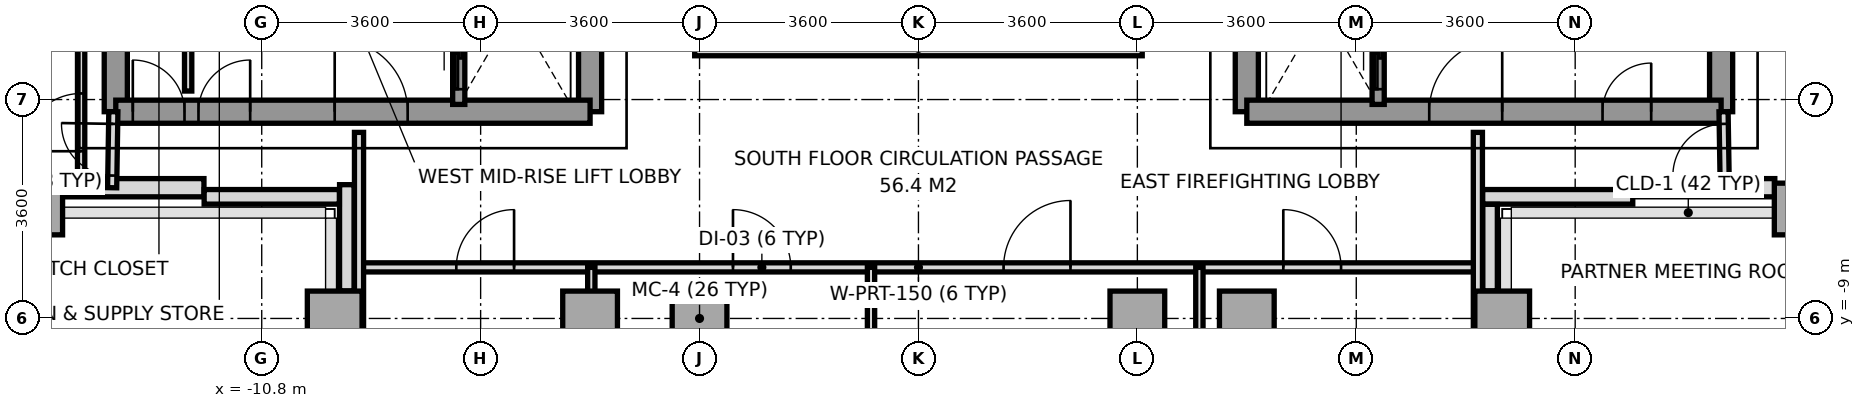
"""IFC4 building model, lengths in metres.
Left out: names, types, materials, properties, quantities, classifications, styles, units other than length and angle.
Written with IfcOpenShell. Run it as: python <this file> out.ifc"""

import sys

from ifc_helpers import new_model, si_unit, direction, frame, frame_2d, origin, origin_2d, place, context, subcontext, project, spatial, rectangle, extrude, source, transform, mapped, element, fill, save


model = new_model("IFC4")
c1 = context("Model", 3, precision=1e-05, world=origin(), true_north=direction((0.0, 1.0)))
c2 = subcontext(c1, "Body", "Model", "MODEL_VIEW")
j1 = project(units=[si_unit("LENGTHUNIT", "METRE"), si_unit("PLANEANGLEUNIT", "RADIAN")], contexts=[c1])
p1 = place(None, origin())
s1 = spatial("IfcSite", under=j1, at=p1, CompositionType="ELEMENT")
p2 = place(p1, origin())
s2 = spatial("IfcBuilding", under=s1, at=p2, CompositionType="ELEMENT")
p3 = place(p2, frame((0.0, 0.0, 160.4)))
s3 = spatial("IfcBuildingStorey", under=s2, at=p3, CompositionType="ELEMENT", Elevation=160.4)
m1 = source(origin(), c2, "Body", "SweptSolid", [
    extrude(rectangle(XDim=0.65, YDim=0.85, at=origin_2d()), origin(), (0.0, 0.0, 1.0), 3.2),
])
p4 = place(p3, frame((-14.4, -7.2, 0.0), z_axis=(0.0, 0.0, 1.0), x_axis=(1.0, 0.0, 0.0)))
e1 = element("IfcColumn", 1, at=p4, inside=s3, PredefinedType="COLUMN", context=c2, shape_type="MappedRepresentation", body=[
    mapped(m1, transform((0.0, 0.0, 0.0), x_axis=(1.0, 0.0, 0.0), y_axis=(0.0, 1.0, 0.0), z_axis=(0.0, 0.0, 1.0), scale=1.0)),
])
m2 = source(origin(), c2, "Body", "SweptSolid", [
    extrude(rectangle(XDim=0.9, YDim=0.9, at=origin_2d()), origin(), (0.0, 0.0, 1.0), 3.2),
])
for number, where, z_axis, x_axis in (
    (2, (-9.6, -9.0, 0.0), (0.0, 0.0, 1.0), (1.0, 0.0, 0.0)),
    (3, (-5.4, -9.0, 0.0), (0.0, 0.0, 1.0), (1.0, 0.0, 0.0)),
    (4, (-3.6, -9.0, 0.0), (0.0, 0.0, 1.0), (1.0, 0.0, 0.0)),
    (5, (3.6, -9.0, 0.0), (0.0, 0.0, 1.0), (1.0, 0.0, 0.0)),
    (6, (5.4, -9.0, 0.0), (0.0, 0.0, 1.0), (1.0, 0.0, 0.0)),
    (7, (9.6, -9.0, 0.0), (0.0, 0.0, 1.0), (1.0, 0.0, 0.0)),
):
    element("IfcColumn", number, at=place(p3, frame(where, z_axis=z_axis, x_axis=x_axis)), inside=s3, PredefinedType="COLUMN", context=c2, shape_type="MappedRepresentation", body=[
        mapped(m2, transform((0.0, 0.0, 0.0), x_axis=(1.0, 0.0, 0.0), y_axis=(0.0, 1.0, 0.0), z_axis=(0.0, 0.0, 1.0), scale=1.0)),
    ])
p5 = place(p3, frame((14.4, -7.2, 0.0), z_axis=(0.0, 0.0, 1.0), x_axis=(1.0, 0.0, 0.0)))
e8 = element("IfcColumn", 8, at=p5, inside=s3, PredefinedType="COLUMN", context=c2, shape_type="MappedRepresentation", body=[
    mapped(m1, transform((0.0, 0.0, 0.0), x_axis=(1.0, 0.0, 0.0), y_axis=(0.0, 1.0, 0.0), z_axis=(0.0, 0.0, 1.0), scale=1.0)),
])
for number, where, z_axis, x_axis in (
    (9, (-14.083, -6.85, 0.0), (0.0, 0.0, 1.0), (1.0, 0.0, 0.0)),
    (10, (11.75, -6.85, 0.0), (0.0, 0.0, 1.0), (1.0, 0.0, 0.0)),
):
    element("IfcWall", number, at=place(p3, frame(where, z_axis=z_axis, x_axis=x_axis)), inside=s3, PredefinedType="SOLIDWALL", context=c2, shape_type="SweptSolid", body=[
        extrude(rectangle(XDim=2.333, YDim=0.3, at=frame_2d((1.167, 0.0))), origin(), (0.0, 0.0, 1.0), 3.2),
    ])
p6 = place(p3, frame((11.747, -7.0, 0.0), z_axis=(0.0, 0.0, 1.0), x_axis=(-1.0, 0.0, 0.0)))
e11 = element("IfcWall", 11, at=p6, inside=s3, PredefinedType="PARAPET", context=c2, shape_type="SweptSolid", body=[
    extrude(rectangle(XDim=2.469, YDim=0.24, at=frame_2d((1.234, 0.0))), origin(), (0.0, 0.0, 1.0), 1.15),
])
p7 = place(p3, frame((9.4, -7.123, 0.0), z_axis=(0.0, 0.0, 1.0), x_axis=(0.0, -1.0, 0.0)))
e12 = element("IfcWall", 12, at=p7, inside=s3, PredefinedType="PARAPET", context=c2, shape_type="SweptSolid", body=[
    extrude(rectangle(XDim=1.424, YDim=0.24, at=frame_2d((0.712, 0.0))), origin(), (0.0, 0.0, 1.0), 1.15),
])
p8 = place(p3, frame((-9.4, -8.547, 0.0), z_axis=(0.0, 0.0, 1.0), x_axis=(0.0, 1.0, 0.0)))
e13 = element("IfcWall", 13, at=p8, inside=s3, PredefinedType="PARAPET", context=c2, shape_type="SweptSolid", body=[
    extrude(rectangle(XDim=1.747, YDim=0.24, at=frame_2d((0.874, 0.0))), origin(), (0.0, 0.0, 1.0), 1.15),
])
p9 = place(p3, frame((-9.523, -7.0, 0.0), z_axis=(0.0, 0.0, 1.0), x_axis=(-1.0, 0.0, 0.0)))
e14 = element("IfcWall", 14, at=p9, inside=s3, PredefinedType="PARAPET", context=c2, shape_type="SweptSolid", body=[
    extrude(rectangle(XDim=2.224, YDim=0.24, at=frame_2d((1.112, 0.0))), origin(), (0.0, 0.0, 1.0), 1.15),
])
p10 = place(p3, frame((-13.2, -5.6, 0.0), z_axis=(0.0, 0.0, 1.0), x_axis=(0.0, 1.0, 0.0)))
e15 = element("IfcWall", 15, at=p10, inside=s3, PredefinedType="SHEAR", context=c2, shape_type="SweptSolid", body=[
    extrude(rectangle(XDim=11.2, YDim=0.38, at=frame_2d((5.6, 0.0))), origin(), (0.0, 0.0, 1.0), 3.2),
])
p11 = place(p3, frame((-5.4, -5.6, 0.0), z_axis=(0.0, 0.0, 1.0), x_axis=(0.0, 1.0, 0.0)))
e16 = element("IfcWall", 16, at=p11, inside=s3, PredefinedType="SHEAR", context=c2, shape_type="SweptSolid", body=[
    extrude(rectangle(XDim=12.5, YDim=0.38, at=frame_2d((6.25, 0.0))), origin(), (0.0, 0.0, 1.0), 3.2),
])
p12 = place(p11, frame((4.55, 0.0, 0.0)))
e17 = element("IfcOpeningElement", 17, at=p12, cuts=e16, PredefinedType="OPENING", context=c2, shape_type="SweptSolid", body=[
    extrude(rectangle(XDim=1.2, YDim=2.2, at=frame_2d((0.6, 1.1))), frame((0.0, 0.2, 0.0), z_axis=(0.0, -1.0, 0.0), x_axis=(1.0, 0.0, 0.0)), (0.0, 0.0, 1.0), 0.4),
])
p13 = place(p11, frame((6.86, 0.0, 0.0)))
e18 = element("IfcOpeningElement", 18, at=p13, cuts=e16, PredefinedType="OPENING", context=c2, shape_type="SweptSolid", body=[
    extrude(rectangle(XDim=0.8, YDim=2.1, at=frame_2d((0.4, 1.05))), frame((0.0, 0.2, 0.0), z_axis=(0.0, -1.0, 0.0), x_axis=(1.0, 0.0, 0.0)), (0.0, 0.0, 1.0), 0.4),
])
p14 = place(p3, frame((-13.2, -5.6, 0.0), z_axis=(0.0, 0.0, 1.0), x_axis=(1.0, 0.0, 0.0)))
e19 = element("IfcWall", 19, at=p14, inside=s3, PredefinedType="SHEAR", context=c2, shape_type="SweptSolid", body=[
    extrude(rectangle(XDim=7.8, YDim=0.38, at=frame_2d((3.9, 0.0))), origin(), (0.0, 0.0, 1.0), 3.2),
])
p15 = place(p14, frame((3.6, 0.0, 0.0)))
e20 = element("IfcOpeningElement", 20, at=p15, cuts=e19, PredefinedType="OPENING", context=c2, shape_type="SweptSolid", body=[
    extrude(rectangle(XDim=1.2, YDim=2.2, at=frame_2d((0.6, 1.1))), frame((0.0, 0.2, 0.0), z_axis=(0.0, -1.0, 0.0), x_axis=(1.0, 0.0, 0.0)), (0.0, 0.0, 1.0), 0.4),
])
p16 = place(p14, frame((0.28, 0.0, 0.0)))
e21 = element("IfcOpeningElement", 21, at=p16, cuts=e19, PredefinedType="OPENING", context=c2, shape_type="SweptSolid", body=[
    extrude(rectangle(XDim=0.85, YDim=2.1, at=frame_2d((0.425, 1.05))), frame((0.0, 0.2, 0.0), z_axis=(0.0, -1.0, 0.0), x_axis=(1.0, 0.0, 0.0)), (0.0, 0.0, 1.0), 0.4),
])
p17 = place(p14, frame((1.36, 0.0, 0.0)))
e22 = element("IfcOpeningElement", 22, at=p17, cuts=e19, PredefinedType="OPENING", context=c2, shape_type="SweptSolid", body=[
    extrude(rectangle(XDim=0.85, YDim=2.1, at=frame_2d((0.425, 1.05))), frame((0.0, 0.2, 0.0), z_axis=(0.0, -1.0, 0.0), x_axis=(1.0, 0.0, 0.0)), (0.0, 0.0, 1.0), 0.4),
])
p18 = place(p3, frame((13.2, -5.6, 0.0), z_axis=(0.0, 0.0, 1.0), x_axis=(0.0, 1.0, 0.0)))
e23 = element("IfcWall", 23, at=p18, inside=s3, PredefinedType="SHEAR", context=c2, shape_type="SweptSolid", body=[
    extrude(rectangle(XDim=11.2, YDim=0.38, at=frame_2d((5.6, 0.0))), origin(), (0.0, 0.0, 1.0), 3.2),
])
p19 = place(p3, frame((5.4, -5.6, 0.0), z_axis=(0.0, 0.0, 1.0), x_axis=(0.0, 1.0, 0.0)))
e24 = element("IfcWall", 24, at=p19, inside=s3, PredefinedType="SHEAR", context=c2, shape_type="SweptSolid", body=[
    extrude(rectangle(XDim=12.5, YDim=0.38, at=frame_2d((6.25, 0.0))), origin(), (0.0, 0.0, 1.0), 3.2),
])
p20 = place(p19, frame((4.55, 0.0, 0.0)))
e25 = element("IfcOpeningElement", 25, at=p20, cuts=e24, PredefinedType="OPENING", context=c2, shape_type="SweptSolid", body=[
    extrude(rectangle(XDim=1.2, YDim=2.2, at=frame_2d((0.6, 1.1))), frame((0.0, 0.2, 0.0), z_axis=(0.0, -1.0, 0.0), x_axis=(1.0, 0.0, 0.0)), (0.0, 0.0, 1.0), 0.4),
])
p21 = place(p19, frame((6.86, 0.0, 0.0)))
e26 = element("IfcOpeningElement", 26, at=p21, cuts=e24, PredefinedType="OPENING", context=c2, shape_type="SweptSolid", body=[
    extrude(rectangle(XDim=0.8, YDim=2.1, at=frame_2d((0.4, 1.05))), frame((0.0, 0.2, 0.0), z_axis=(0.0, -1.0, 0.0), x_axis=(1.0, 0.0, 0.0)), (0.0, 0.0, 1.0), 0.4),
])
p22 = place(p19, frame((7.88, 0.0, 0.0)))
e27 = element("IfcOpeningElement", 27, at=p22, cuts=e24, PredefinedType="OPENING", context=c2, shape_type="SweptSolid", body=[
    extrude(rectangle(XDim=0.8, YDim=2.1, at=frame_2d((0.4, 1.05))), frame((0.0, 0.2, 0.0), z_axis=(0.0, -1.0, 0.0), x_axis=(1.0, 0.0, 0.0)), (0.0, 0.0, 1.0), 0.4),
])
p23 = place(p3, frame((5.4, -5.6, 0.0), z_axis=(0.0, 0.0, 1.0), x_axis=(1.0, 0.0, 0.0)))
e28 = element("IfcWall", 28, at=p23, inside=s3, PredefinedType="SHEAR", context=c2, shape_type="SweptSolid", body=[
    extrude(rectangle(XDim=7.8, YDim=0.38, at=frame_2d((3.9, 0.0))), origin(), (0.0, 0.0, 1.0), 3.2),
])
p24 = place(p23, frame((3.0, 0.0, 0.0)))
e29 = element("IfcOpeningElement", 29, at=p24, cuts=e28, PredefinedType="OPENING", context=c2, shape_type="SweptSolid", body=[
    extrude(rectangle(XDim=1.2, YDim=2.2, at=frame_2d((0.6, 1.1))), frame((0.0, 0.2, 0.0), z_axis=(0.0, -1.0, 0.0), x_axis=(1.0, 0.0, 0.0)), (0.0, 0.0, 1.0), 0.4),
])
p25 = place(p23, frame((5.85, 0.0, 0.0)))
e30 = element("IfcOpeningElement", 30, at=p25, cuts=e28, PredefinedType="OPENING", context=c2, shape_type="SweptSolid", body=[
    extrude(rectangle(XDim=0.8, YDim=2.1, at=frame_2d((0.4, 1.05))), frame((0.0, 0.2, 0.0), z_axis=(0.0, -1.0, 0.0), x_axis=(1.0, 0.0, 0.0)), (0.0, 0.0, 1.0), 0.4),
])
p26 = place(p3, frame((-7.56, -5.48, 0.0), z_axis=(0.0, 0.0, 1.0), x_axis=(0.0, 1.0, 0.0)))
e31 = element("IfcWall", 31, at=p26, inside=s3, PredefinedType="SOLIDWALL", context=c2, shape_type="SweptSolid", body=[
    extrude(rectangle(XDim=1.6, YDim=0.2, at=frame_2d((0.8, 0.0))), origin(), (0.0, 0.0, 1.0), 3.2),
])
p27 = place(p26, frame((0.25, 0.0, 0.0)))
e32 = element("IfcOpeningElement", 32, at=p27, cuts=e31, PredefinedType="OPENING", context=c2, shape_type="SweptSolid", body=[
    extrude(rectangle(XDim=1.1, YDim=2.2, at=frame_2d((0.55, 1.1))), frame((0.0, 0.11, 0.0), z_axis=(0.0, -1.0, 0.0), x_axis=(1.0, 0.0, 0.0)), (0.0, 0.0, 1.0), 0.22),
])
p28 = place(p3, frame((7.56, -5.48, 0.0), z_axis=(0.0, 0.0, 1.0), x_axis=(0.0, 1.0, 0.0)))
e33 = element("IfcWall", 33, at=p28, inside=s3, PredefinedType="SOLIDWALL", context=c2, shape_type="SweptSolid", body=[
    extrude(rectangle(XDim=1.6, YDim=0.2, at=frame_2d((0.8, 0.0))), origin(), (0.0, 0.0, 1.0), 3.2),
])
p29 = place(p28, frame((0.25, 0.0, 0.0)))
e34 = element("IfcOpeningElement", 34, at=p29, cuts=e33, PredefinedType="OPENING", context=c2, shape_type="SweptSolid", body=[
    extrude(rectangle(XDim=1.1, YDim=2.2, at=frame_2d((0.55, 1.1))), frame((0.0, 0.11, 0.0), z_axis=(0.0, -1.0, 0.0), x_axis=(1.0, 0.0, 0.0)), (0.0, 0.0, 1.0), 0.22),
])
p30 = place(p3, frame((-12.01, -5.26, 0.0), z_axis=(0.0, 0.0, 1.0), x_axis=(0.0, 1.0, 0.0)))
e35 = element("IfcWall", 35, at=p30, inside=s3, PredefinedType="PARTITIONING", context=c2, shape_type="SweptSolid", body=[
    extrude(rectangle(XDim=2.94, YDim=0.12, at=frame_2d((1.47, 0.0))), origin(), (0.0, 0.0, 1.0), 3.2),
])
p31 = place(p3, frame((-9.2, -8.16, 0.0), z_axis=(0.0, 0.0, 1.0), x_axis=(1.0, 0.0, 0.0)))
e36 = element("IfcWall", 36, at=p31, inside=s3, PredefinedType="PARTITIONING", context=c2, shape_type="SweptSolid", body=[
    extrude(rectangle(XDim=18.4, YDim=0.15, at=frame_2d((9.2, 0.0))), origin(), (0.0, 0.0, 1.0), 2.8),
])
p32 = place(p31, frame((1.6, 0.0, 0.0)))
e37 = element("IfcOpeningElement", 37, at=p32, cuts=e36, PredefinedType="OPENING", context=c2, shape_type="SweptSolid", body=[
    extrude(rectangle(XDim=0.95, YDim=2.15, at=frame_2d((0.475, 1.075))), frame((0.0, 0.085, 0.0), z_axis=(0.0, -1.0, 0.0), x_axis=(1.0, 0.0, 0.0)), (0.0, 0.0, 1.0), 0.17),
])
p33 = place(p31, frame((6.15, 0.0, 0.0)))
e38 = element("IfcOpeningElement", 38, at=p33, cuts=e36, PredefinedType="OPENING", context=c2, shape_type="SweptSolid", body=[
    extrude(rectangle(XDim=0.95, YDim=2.15, at=frame_2d((0.475, 1.075))), frame((0.0, 0.085, 0.0), z_axis=(0.0, -1.0, 0.0), x_axis=(1.0, 0.0, 0.0)), (0.0, 0.0, 1.0), 0.17),
])
p34 = place(p31, frame((10.6, 0.0, 0.0)))
e39 = element("IfcOpeningElement", 39, at=p34, cuts=e36, PredefinedType="OPENING", context=c2, shape_type="SweptSolid", body=[
    extrude(rectangle(XDim=1.1, YDim=2.2, at=frame_2d((0.55, 1.1))), frame((0.0, 0.085, 0.0), z_axis=(0.0, -1.0, 0.0), x_axis=(1.0, 0.0, 0.0)), (0.0, 0.0, 1.0), 0.17),
])
p35 = place(p31, frame((15.2, 0.0, 0.0)))
e40 = element("IfcOpeningElement", 40, at=p35, cuts=e36, PredefinedType="OPENING", context=c2, shape_type="SweptSolid", body=[
    extrude(rectangle(XDim=0.95, YDim=2.15, at=frame_2d((0.475, 1.075))), frame((0.0, 0.085, 0.0), z_axis=(0.0, -1.0, 0.0), x_axis=(1.0, 0.0, 0.0)), (0.0, 0.0, 1.0), 0.17),
])
for number, where, z_axis, x_axis in (
    (41, (-9.2, -15.68, 0.0), (0.0, 0.0, 1.0), (0.0, 1.0, 0.0)),
    (42, (9.2, -15.68, 0.0), (0.0, 0.0, 1.0), (0.0, 1.0, 0.0)),
):
    element("IfcWall", number, at=place(p3, frame(where, z_axis=z_axis, x_axis=x_axis)), inside=s3, PredefinedType="PARTITIONING", context=c2, shape_type="SweptSolid", body=[
        extrude(rectangle(XDim=9.74, YDim=0.15, at=frame_2d((4.87, 0.0))), origin(), (0.0, 0.0, 1.0), 2.75),
    ])
for number, where, z_axis, x_axis in (
    (43, (-5.38, -24.65, 0.0), (0.0, 0.0, 1.0), (0.0, 1.0, 0.0)),
    (44, (-0.78, -24.65, 0.0), (0.0, 0.0, 1.0), (0.0, 1.0, 0.0)),
    (45, (4.62, -24.65, 0.0), (0.0, 0.0, 1.0), (0.0, 1.0, 0.0)),
):
    element("IfcWall", number, at=place(p3, frame(where, z_axis=z_axis, x_axis=x_axis)), inside=s3, PredefinedType="PARTITIONING", context=c2, shape_type="SweptSolid", body=[
        extrude(rectangle(XDim=16.49, YDim=0.12, at=frame_2d((8.245, 0.0))), origin(), (0.0, 0.0, 1.0), 2.75),
    ])
p36 = place(p3, frame((-13.26, -6.85, 0.0), z_axis=(0.0, 0.0, 1.0), x_axis=(0.016013571389, 0.999871774545, 0.0)))
e46 = element("IfcWall", 46, at=p36, inside=s3, PredefinedType="PARTITIONING", context=c2, shape_type="SweptSolid", body=[
    extrude(rectangle(XDim=1.25, YDim=0.15, at=frame_2d((0.625, 0.0))), origin(), (0.0, 0.0, 1.0), 3.2),
])
p37 = place(p36, frame((0.2, 0.0, 0.0)))
e47 = element("IfcOpeningElement", 47, at=p37, cuts=e46, PredefinedType="OPENING", context=c2, shape_type="SweptSolid", body=[
    extrude(rectangle(XDim=0.85, YDim=2.1, at=frame_2d((0.425, 1.05))), frame((0.0, 0.085, 0.0), z_axis=(0.0, -1.0, 0.0), x_axis=(1.0, 0.0, 0.0)), (0.0, 0.0, 1.0), 0.17),
])
p38 = place(p3, frame((-13.77, -6.85, 0.0), z_axis=(0.0, 0.0, 1.0), x_axis=(0.0, 1.0, 0.0)))
e48 = element("IfcWall", 48, at=p38, inside=s3, PredefinedType="PARTITIONING", context=c2, shape_type="SweptSolid", body=[
    extrude(rectangle(XDim=13.7, YDim=0.12, at=frame_2d((6.85, 0.0))), origin(), (0.0, 0.0, 1.0), 2.87),
])
p39 = place(p38, frame((0.6, 0.0, 0.0)))
e49 = element("IfcOpeningElement", 49, at=p39, cuts=e48, PredefinedType="OPENING", context=c2, shape_type="SweptSolid", body=[
    extrude(rectangle(XDim=0.95, YDim=2.15, at=frame_2d((0.475, 1.075))), frame((0.0, 0.07, 0.0), z_axis=(0.0, -1.0, 0.0), x_axis=(1.0, 0.0, 0.0)), (0.0, 0.0, 1.0), 0.14),
])
p40 = place(p3, frame((13.26, -6.85, 0.0), z_axis=(0.0, 0.0, 1.0), x_axis=(-0.016013571389, 0.999871774545, 0.0)))
e50 = element("IfcWall", 50, at=p40, inside=s3, PredefinedType="PARTITIONING", context=c2, shape_type="SweptSolid", body=[
    extrude(rectangle(XDim=1.25, YDim=0.15, at=frame_2d((0.625, 0.0))), origin(), (0.0, 0.0, 1.0), 3.2),
])
p41 = place(p40, frame((0.2, 0.0, 0.0)))
e51 = element("IfcOpeningElement", 51, at=p41, cuts=e50, PredefinedType="OPENING", context=c2, shape_type="SweptSolid", body=[
    extrude(rectangle(XDim=0.85, YDim=2.1, at=frame_2d((0.425, 1.05))), frame((0.0, 0.085, 0.0), z_axis=(0.0, -1.0, 0.0), x_axis=(1.0, 0.0, 0.0)), (0.0, 0.0, 1.0), 0.17),
])
p42 = place(p3, frame((-3.68, -4.56, 0.0), z_axis=(0.0, 0.0, 1.0), x_axis=(1.0, 0.0, 0.0)))
e52 = element("IfcWall", 52, at=p42, inside=s3, PredefinedType="PARAPET", context=c2, shape_type="SweptSolid", body=[
    extrude(rectangle(XDim=7.36, YDim=0.24, at=frame_2d((3.68, 0.0))), origin(), (0.0, 0.0, 1.0), 1.15),
])
m3 = source(origin(), c2, "Body", "SweptSolid", [
    extrude(rectangle(XDim=1.2, YDim=2.2, at=frame_2d((0.6, 1.1))), frame((0.0, 0.025, 0.0), z_axis=(0.0, -1.0, 0.0), x_axis=(1.0, 0.0, 0.0)), (0.0, 0.0, 1.0), 0.05),
])
p43 = place(p15, origin())
e53 = element("IfcDoor", 53, at=p43, inside=s3, OperationType="SINGLE_SWING_LEFT", PredefinedType="DOOR", context=c2, shape_type="MappedRepresentation", body=[
    mapped(m3, transform((0.0, 0.0, 0.0), x_axis=(1.0, 0.0, 0.0), y_axis=(0.0, 1.0, 0.0), z_axis=(0.0, 0.0, 1.0), scale=1.0)),
])
fill(e20, e53)
p44 = place(p24, origin())
e54 = element("IfcDoor", 54, at=p44, inside=s3, OperationType="SINGLE_SWING_RIGHT", PredefinedType="DOOR", context=c2, shape_type="MappedRepresentation", body=[
    mapped(m3, transform((0.0, 0.0, 0.0), x_axis=(1.0, 0.0, 0.0), y_axis=(0.0, 1.0, 0.0), z_axis=(0.0, 0.0, 1.0), scale=1.0)),
])
fill(e29, e54)
m4 = source(origin(), c2, "Body", "SweptSolid", [
    extrude(rectangle(XDim=0.85, YDim=2.1, at=frame_2d((0.425, 1.05))), frame((0.0, 0.025, 0.0), z_axis=(0.0, -1.0, 0.0), x_axis=(1.0, 0.0, 0.0)), (0.0, 0.0, 1.0), 0.05),
])
p45 = place(p16, origin())
e55 = element("IfcDoor", 55, at=p45, inside=s3, OperationType="SINGLE_SWING_LEFT", PredefinedType="DOOR", context=c2, shape_type="MappedRepresentation", body=[
    mapped(m4, transform((0.0, 0.0, 0.0), x_axis=(1.0, 0.0, 0.0), y_axis=(0.0, 1.0, 0.0), z_axis=(0.0, 0.0, 1.0), scale=1.0)),
])
fill(e21, e55)
p46 = place(p17, origin())
e56 = element("IfcDoor", 56, at=p46, inside=s3, OperationType="SINGLE_SWING_RIGHT", PredefinedType="DOOR", context=c2, shape_type="MappedRepresentation", body=[
    mapped(m4, transform((0.0, 0.0, 0.0), x_axis=(1.0, 0.0, 0.0), y_axis=(0.0, 1.0, 0.0), z_axis=(0.0, 0.0, 1.0), scale=1.0)),
])
fill(e22, e56)
m5 = source(origin(), c2, "Body", "SweptSolid", [
    extrude(rectangle(XDim=0.8, YDim=2.1, at=frame_2d((0.4, 1.05))), frame((0.0, 0.025, 0.0), z_axis=(0.0, -1.0, 0.0), x_axis=(1.0, 0.0, 0.0)), (0.0, 0.0, 1.0), 0.05),
])
p47 = place(p25, origin())
e57 = element("IfcDoor", 57, at=p47, inside=s3, OperationType="SINGLE_SWING_RIGHT", PredefinedType="DOOR", context=c2, shape_type="MappedRepresentation", body=[
    mapped(m5, transform((0.0, 0.0, 0.0), x_axis=(1.0, 0.0, 0.0), y_axis=(0.0, 1.0, 0.0), z_axis=(0.0, 0.0, 1.0), scale=1.0)),
])
fill(e30, e57)
m6 = source(origin(), c2, "Body", "SweptSolid", [
    extrude(rectangle(XDim=1.1, YDim=2.2, at=frame_2d((0.55, 1.1))), frame((0.0, 0.025, 0.0), z_axis=(0.0, -1.0, 0.0), x_axis=(1.0, 0.0, 0.0)), (0.0, 0.0, 1.0), 0.05),
])
p48 = place(p27, origin())
e58 = element("IfcDoor", 58, at=p48, inside=s3, OperationType="SLIDING_TO_LEFT", PredefinedType="DOOR", context=c2, shape_type="MappedRepresentation", body=[
    mapped(m6, transform((0.0, 0.0, 0.0), x_axis=(1.0, 0.0, 0.0), y_axis=(0.0, 1.0, 0.0), z_axis=(0.0, 0.0, 1.0), scale=1.0)),
])
fill(e32, e58)
p49 = place(p29, origin())
e59 = element("IfcDoor", 59, at=p49, inside=s3, OperationType="SLIDING_TO_LEFT", PredefinedType="DOOR", context=c2, shape_type="MappedRepresentation", body=[
    mapped(m6, transform((0.0, 0.0, 0.0), x_axis=(1.0, 0.0, 0.0), y_axis=(0.0, 1.0, 0.0), z_axis=(0.0, 0.0, 1.0), scale=1.0)),
])
fill(e34, e59)
m7 = source(origin(), c2, "Body", "SweptSolid", [
    extrude(rectangle(XDim=0.95, YDim=2.15, at=frame_2d((0.475, 1.075))), frame((0.0, 0.025, 0.0), z_axis=(0.0, -1.0, 0.0), x_axis=(1.0, 0.0, 0.0)), (0.0, 0.0, 1.0), 0.05),
])
p50 = place(p32, origin())
e60 = element("IfcDoor", 60, at=p50, inside=s3, OperationType="SINGLE_SWING_RIGHT", PredefinedType="DOOR", context=c2, shape_type="MappedRepresentation", body=[
    mapped(m7, transform((0.0, 0.0, 0.0), x_axis=(1.0, 0.0, 0.0), y_axis=(0.0, 1.0, 0.0), z_axis=(0.0, 0.0, 1.0), scale=1.0)),
])
fill(e37, e60)
p51 = place(p33, origin())
e61 = element("IfcDoor", 61, at=p51, inside=s3, OperationType="SINGLE_SWING_LEFT", PredefinedType="DOOR", context=c2, shape_type="MappedRepresentation", body=[
    mapped(m7, transform((0.0, 0.0, 0.0), x_axis=(1.0, 0.0, 0.0), y_axis=(0.0, 1.0, 0.0), z_axis=(0.0, 0.0, 1.0), scale=1.0)),
])
fill(e38, e61)
p52 = place(p34, origin())
e62 = element("IfcDoor", 62, at=p52, inside=s3, OperationType="SINGLE_SWING_RIGHT", PredefinedType="DOOR", context=c2, shape_type="MappedRepresentation", body=[
    mapped(m6, transform((0.0, 0.0, 0.0), x_axis=(1.0, 0.0, 0.0), y_axis=(0.0, 1.0, 0.0), z_axis=(0.0, 0.0, 1.0), scale=1.0)),
])
fill(e39, e62)
p53 = place(p35, origin())
e63 = element("IfcDoor", 63, at=p53, inside=s3, OperationType="SINGLE_SWING_LEFT", PredefinedType="DOOR", context=c2, shape_type="MappedRepresentation", body=[
    mapped(m7, transform((0.0, 0.0, 0.0), x_axis=(1.0, 0.0, 0.0), y_axis=(0.0, 1.0, 0.0), z_axis=(0.0, 0.0, 1.0), scale=1.0)),
])
fill(e40, e63)
p54 = place(p39, origin())
e64 = element("IfcDoor", 64, at=p54, inside=s3, OperationType="SINGLE_SWING_LEFT", PredefinedType="DOOR", context=c2, shape_type="MappedRepresentation", body=[
    mapped(m7, transform((0.0, 0.0, 0.0), x_axis=(1.0, 0.0, 0.0), y_axis=(0.0, 1.0, 0.0), z_axis=(0.0, 0.0, 1.0), scale=1.0)),
])
fill(e49, e64)
p55 = place(p37, origin())
e65 = element("IfcDoor", 65, at=p55, inside=s3, OperationType="SINGLE_SWING_RIGHT", PredefinedType="DOOR", context=c2, shape_type="MappedRepresentation", body=[
    mapped(m4, transform((0.0, 0.0, 0.0), x_axis=(1.0, 0.0, 0.0), y_axis=(0.0, 1.0, 0.0), z_axis=(0.0, 0.0, 1.0), scale=1.0)),
])
fill(e47, e65)
p56 = place(p41, origin())
e66 = element("IfcDoor", 66, at=p56, inside=s3, OperationType="SINGLE_SWING_LEFT", PredefinedType="DOOR", context=c2, shape_type="MappedRepresentation", body=[
    mapped(m4, transform((0.0, 0.0, 0.0), x_axis=(1.0, 0.0, 0.0), y_axis=(0.0, 1.0, 0.0), z_axis=(0.0, 0.0, 1.0), scale=1.0)),
])
fill(e51, e66)
save(model, sys.argv[1])
